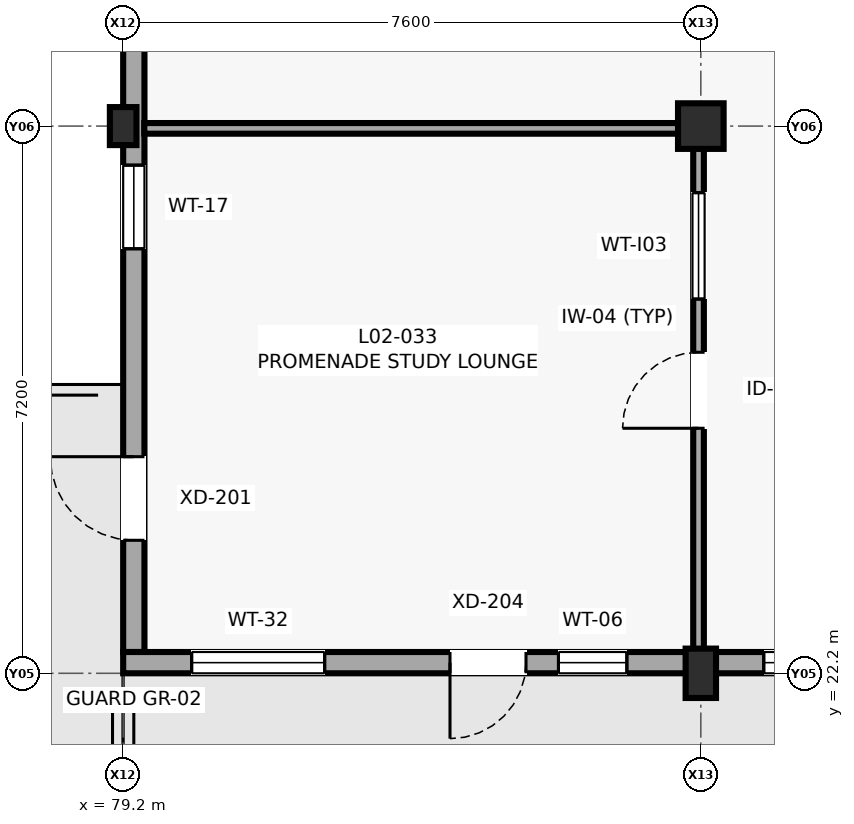
"""IFC4 building model, lengths in metres.
Left out: names, types, materials, properties, quantities, classifications, styles, units other than length and angle.
Written with IfcOpenShell. Run it as: python <this file> out.ifc"""

import sys

from ifc_helpers import new_model, si_unit, direction, frame, frame_2d, origin, origin_2d, place, context, subcontext, project, spatial, rectangle, extrude, element, fill, save


model = new_model("IFC4")
c1 = context("Model", 3, precision=1e-05, world=origin(), true_north=direction((0.0, 1.0)))
c2 = subcontext(c1, "Body", "Model", "MODEL_VIEW")
j1 = project(units=[si_unit("LENGTHUNIT", "METRE"), si_unit("PLANEANGLEUNIT", "RADIAN")], contexts=[c1])
p1 = place(None, origin())
s1 = spatial("IfcSite", under=j1, at=p1, CompositionType="ELEMENT")
p2 = place(p1, origin())
s2 = spatial("IfcBuilding", under=s1, at=p2, CompositionType="ELEMENT")
p3 = place(p2, frame((0.0, 0.0, 8.2)))
s3 = spatial("IfcBuildingStorey", under=s2, at=p3, CompositionType="ELEMENT", Elevation=8.2)
p4 = place(p3, frame((79.2, 29.4, 0.0), z_axis=(0.0, 0.0, 1.0), x_axis=(1.0, 0.0, 0.0)))
e1 = element("IfcColumn", 1, at=p4, inside=s3, PredefinedType="PILASTER", context=c2, shape_type="SweptSolid", body=[
    extrude(rectangle(XDim=0.35, YDim=0.5, at=origin_2d()), origin(), (0.0, 0.0, 1.0), 4.0),
])
p5 = place(p3, frame((86.8, 22.2, 0.0), z_axis=(0.0, 0.0, 1.0), x_axis=(1.0, 0.0, 0.0)))
e2 = element("IfcColumn", 2, at=p5, inside=s3, PredefinedType="COLUMN", context=c2, shape_type="SweptSolid", body=[
    extrude(rectangle(XDim=0.4, YDim=0.65, at=origin_2d()), origin(), (0.0, 0.0, 1.0), 4.0),
])
p6 = place(p3, frame((86.8, 29.4, 0.0), z_axis=(0.0, 0.0, 1.0), x_axis=(1.0, 0.0, 0.0)))
e3 = element("IfcColumn", 3, at=p6, inside=s3, PredefinedType="COLUMN", context=c2, shape_type="SweptSolid", body=[
    extrude(rectangle(XDim=0.6, YDim=0.6, at=origin_2d()), origin(), (0.0, 0.0, 1.0), 4.0),
])
p7 = place(p3, frame((79.34, 42.0, 0.0), z_axis=(0.0, 0.0, 1.0), x_axis=(0.0, -1.0, 0.0)))
e4 = element("IfcWall", 4, at=p7, inside=s3, PredefinedType="SOLIDWALL", context=c2, shape_type="SweptSolid", body=[
    extrude(rectangle(XDim=19.52, YDim=0.28, at=frame_2d((9.76, 0.0))), origin(), (0.0, 0.0, 1.0), 3.225),
])
p8 = place(p7, frame((16.95, 0.0, 0.0)))
e5 = element("IfcOpeningElement", 5, at=p8, cuts=e4, PredefinedType="OPENING", context=c2, shape_type="SweptSolid", body=[
    extrude(rectangle(XDim=1.1, YDim=2.15, at=frame_2d((0.55, 1.075))), frame((0.0, 0.15, 0.0), z_axis=(0.0, -1.0, 0.0), x_axis=(1.0, 0.0, 0.0)), (0.0, 0.0, 1.0), 0.3),
])
p9 = place(p7, frame((9.385, 0.0, 0.85)))
e6 = element("IfcOpeningElement", 6, at=p9, cuts=e4, PredefinedType="OPENING", context=c2, shape_type="SweptSolid", body=[
    extrude(rectangle(XDim=1.65, YDim=1.95, at=frame_2d((0.825, 0.975))), frame((0.0, 0.15, 0.0), z_axis=(0.0, -1.0, 0.0), x_axis=(1.0, 0.0, 0.0)), (0.0, 0.0, 1.0), 0.3),
])
p10 = place(p7, frame((13.114, 0.0, 0.75)))
e7 = element("IfcOpeningElement", 7, at=p10, cuts=e4, PredefinedType="OPENING", context=c2, shape_type="SweptSolid", body=[
    extrude(rectangle(XDim=1.1, YDim=2.1, at=frame_2d((0.55, 1.05))), frame((0.0, 0.15, 0.0), z_axis=(0.0, -1.0, 0.0), x_axis=(1.0, 0.0, 0.0)), (0.0, 0.0, 1.0), 0.3),
])
p11 = place(p3, frame((79.2, 22.34, 0.0), z_axis=(0.0, 0.0, 1.0), x_axis=(1.0, 0.0, 0.0)))
e8 = element("IfcWall", 8, at=p11, inside=s3, PredefinedType="SOLIDWALL", context=c2, shape_type="SweptSolid", body=[
    extrude(rectangle(XDim=10.654, YDim=0.28, at=frame_2d((5.327, 0.0))), origin(), (0.0, 0.0, 1.0), 3.78),
])
p12 = place(p11, frame((4.3, 0.0, 0.0)))
e9 = element("IfcOpeningElement", 9, at=p12, cuts=e8, PredefinedType="OPENING", context=c2, shape_type="SweptSolid", body=[
    extrude(rectangle(XDim=1.0, YDim=2.1, at=frame_2d((0.5, 1.05))), frame((0.0, 0.15, 0.0), z_axis=(0.0, -1.0, 0.0), x_axis=(1.0, 0.0, 0.0)), (0.0, 0.0, 1.0), 0.3),
])
p13 = place(p11, frame((0.901, 0.0, 0.75)))
e10 = element("IfcOpeningElement", 10, at=p13, cuts=e8, PredefinedType="OPENING", context=c2, shape_type="SweptSolid", body=[
    extrude(rectangle(XDim=1.75, YDim=2.05, at=frame_2d((0.875, 1.025))), frame((0.0, 0.15, 0.0), z_axis=(0.0, -1.0, 0.0), x_axis=(1.0, 0.0, 0.0)), (0.0, 0.0, 1.0), 0.3),
])
p14 = place(p11, frame((5.727, 0.0, 1.05)))
e11 = element("IfcOpeningElement", 11, at=p14, cuts=e8, PredefinedType="OPENING", context=c2, shape_type="SweptSolid", body=[
    extrude(rectangle(XDim=0.9, YDim=1.5, at=frame_2d((0.45, 0.75))), frame((0.0, 0.15, 0.0), z_axis=(0.0, -1.0, 0.0), x_axis=(1.0, 0.0, 0.0)), (0.0, 0.0, 1.0), 0.3),
])
p15 = place(p11, frame((8.428, 0.0, 0.85)))
e12 = element("IfcOpeningElement", 12, at=p15, cuts=e8, PredefinedType="OPENING", context=c2, shape_type="SweptSolid", body=[
    extrude(rectangle(XDim=1.8, YDim=1.8, at=frame_2d((0.9, 0.9))), frame((0.0, 0.15, 0.0), z_axis=(0.0, -1.0, 0.0), x_axis=(1.0, 0.0, 0.0)), (0.0, 0.0, 1.0), 0.3),
])
p16 = place(p3, frame((86.77, 22.478, 0.0), z_axis=(0.0, 0.0, 1.0), x_axis=(0.0, 1.0, 0.0)))
e13 = element("IfcWall", 13, at=p16, inside=s3, PredefinedType="PARTITIONING", context=c2, shape_type="SweptSolid", body=[
    extrude(rectangle(XDim=6.892, YDim=0.14, at=frame_2d((3.446, 0.0))), origin(), (0.0, 0.0, 1.0), 3.26),
])
p17 = place(p16, frame((2.946, 0.0, 0.0)))
e14 = element("IfcOpeningElement", 14, at=p17, cuts=e13, PredefinedType="OPENING", context=c2, shape_type="SweptSolid", body=[
    extrude(rectangle(XDim=1.0, YDim=2.1, at=frame_2d((0.5, 1.05))), frame((0.0, 0.08, 0.0), z_axis=(0.0, -1.0, 0.0), x_axis=(1.0, 0.0, 0.0)), (0.0, 0.0, 1.0), 0.16),
])
p18 = place(p16, frame((4.646, 0.0, 1.05)))
e15 = element("IfcOpeningElement", 15, at=p18, cuts=e13, PredefinedType="OPENING", context=c2, shape_type="SweptSolid", body=[
    extrude(rectangle(XDim=1.4, YDim=1.05, at=frame_2d((0.7, 0.525))), frame((0.0, 0.08, 0.0), z_axis=(0.0, -1.0, 0.0), x_axis=(1.0, 0.0, 0.0)), (0.0, 0.0, 1.0), 0.16),
])
p19 = place(p3, frame((86.702, 29.37, 0.0), z_axis=(0.0, 0.0, 1.0), x_axis=(-1.0, 0.0, 0.0)))
e16 = element("IfcWall", 16, at=p19, inside=s3, PredefinedType="PARTITIONING", context=c2, shape_type="SweptSolid", body=[
    extrude(rectangle(XDim=7.224, YDim=0.14, at=frame_2d((3.612, 0.0))), origin(), (0.0, 0.0, 1.0), 3.01),
])
p20 = place(p8, frame((1.1, 0.0, 0.0), z_axis=(0.0, 0.0, 1.0), x_axis=(-1.0, 0.0, 0.0)))
e17 = element("IfcDoor", 17, at=p20, inside=s3, OperationType="SINGLE_SWING_LEFT", PredefinedType="DOOR", context=c2, shape_type="SweptSolid", body=[
    extrude(rectangle(XDim=1.1, YDim=2.15, at=frame_2d((0.55, 1.075))), frame((0.0, 0.025, 0.0), z_axis=(0.0, -1.0, 0.0), x_axis=(1.0, 0.0, 0.0)), (0.0, 0.0, 1.0), 0.05),
])
fill(e5, e17)
p21 = place(p12, frame((1.0, 0.0, 0.0), z_axis=(0.0, 0.0, 1.0), x_axis=(-1.0, 0.0, 0.0)))
e18 = element("IfcDoor", 18, at=p21, inside=s3, OperationType="SINGLE_SWING_LEFT", PredefinedType="DOOR", context=c2, shape_type="SweptSolid", body=[
    extrude(rectangle(XDim=1.0, YDim=2.1, at=frame_2d((0.5, 1.05))), frame((0.0, 0.025, 0.0), z_axis=(0.0, -1.0, 0.0), x_axis=(1.0, 0.0, 0.0)), (0.0, 0.0, 1.0), 0.05),
])
fill(e9, e18)
p22 = place(p10, origin())
e19 = element("IfcWindow", 19, at=p22, inside=s3, PartitioningType="SINGLE_PANEL", PredefinedType="WINDOW", context=c2, shape_type="SweptSolid", body=[
    extrude(rectangle(XDim=1.1, YDim=2.1, at=frame_2d((0.55, 1.05))), frame((0.0, 0.03, 0.0), z_axis=(0.0, -1.0, 0.0), x_axis=(1.0, 0.0, 0.0)), (0.0, 0.0, 1.0), 0.06),
])
fill(e7, e19)
p23 = place(p13, origin())
e20 = element("IfcWindow", 20, at=p23, inside=s3, PartitioningType="SINGLE_PANEL", PredefinedType="WINDOW", context=c2, shape_type="SweptSolid", body=[
    extrude(rectangle(XDim=1.75, YDim=2.05, at=frame_2d((0.875, 1.025))), frame((0.0, 0.03, 0.0), z_axis=(0.0, -1.0, 0.0), x_axis=(1.0, 0.0, 0.0)), (0.0, 0.0, 1.0), 0.06),
])
fill(e10, e20)
p24 = place(p14, origin())
e21 = element("IfcWindow", 21, at=p24, inside=s3, PartitioningType="SINGLE_PANEL", PredefinedType="WINDOW", context=c2, shape_type="SweptSolid", body=[
    extrude(rectangle(XDim=0.9, YDim=1.5, at=frame_2d((0.45, 0.75))), frame((0.0, 0.03, 0.0), z_axis=(0.0, -1.0, 0.0), x_axis=(1.0, 0.0, 0.0)), (0.0, 0.0, 1.0), 0.06),
])
fill(e11, e21)
p25 = place(p15, origin())
e22 = element("IfcWindow", 22, at=p25, inside=s3, PartitioningType="SINGLE_PANEL", PredefinedType="WINDOW", context=c2, shape_type="SweptSolid", body=[
    extrude(rectangle(XDim=1.8, YDim=1.8, at=frame_2d((0.9, 0.9))), frame((0.0, 0.03, 0.0), z_axis=(0.0, -1.0, 0.0), x_axis=(1.0, 0.0, 0.0)), (0.0, 0.0, 1.0), 0.06),
])
fill(e12, e22)
p26 = place(p17, origin())
e23 = element("IfcDoor", 23, at=p26, inside=s3, OperationType="SINGLE_SWING_LEFT", PredefinedType="DOOR", context=c2, shape_type="SweptSolid", body=[
    extrude(rectangle(XDim=1.0, YDim=2.1, at=frame_2d((0.5, 1.05))), frame((0.0, 0.025, 0.0), z_axis=(0.0, -1.0, 0.0), x_axis=(1.0, 0.0, 0.0)), (0.0, 0.0, 1.0), 0.05),
])
fill(e14, e23)
p27 = place(p18, origin())
e24 = element("IfcWindow", 24, at=p27, inside=s3, PartitioningType="SINGLE_PANEL", PredefinedType="WINDOW", context=c2, shape_type="SweptSolid", body=[
    extrude(rectangle(XDim=1.4, YDim=1.05, at=frame_2d((0.7, 0.525))), frame((0.0, 0.03, 0.0), z_axis=(0.0, -1.0, 0.0), x_axis=(1.0, 0.0, 0.0)), (0.0, 0.0, 1.0), 0.06),
])
fill(e15, e24)
save(model, sys.argv[1])
